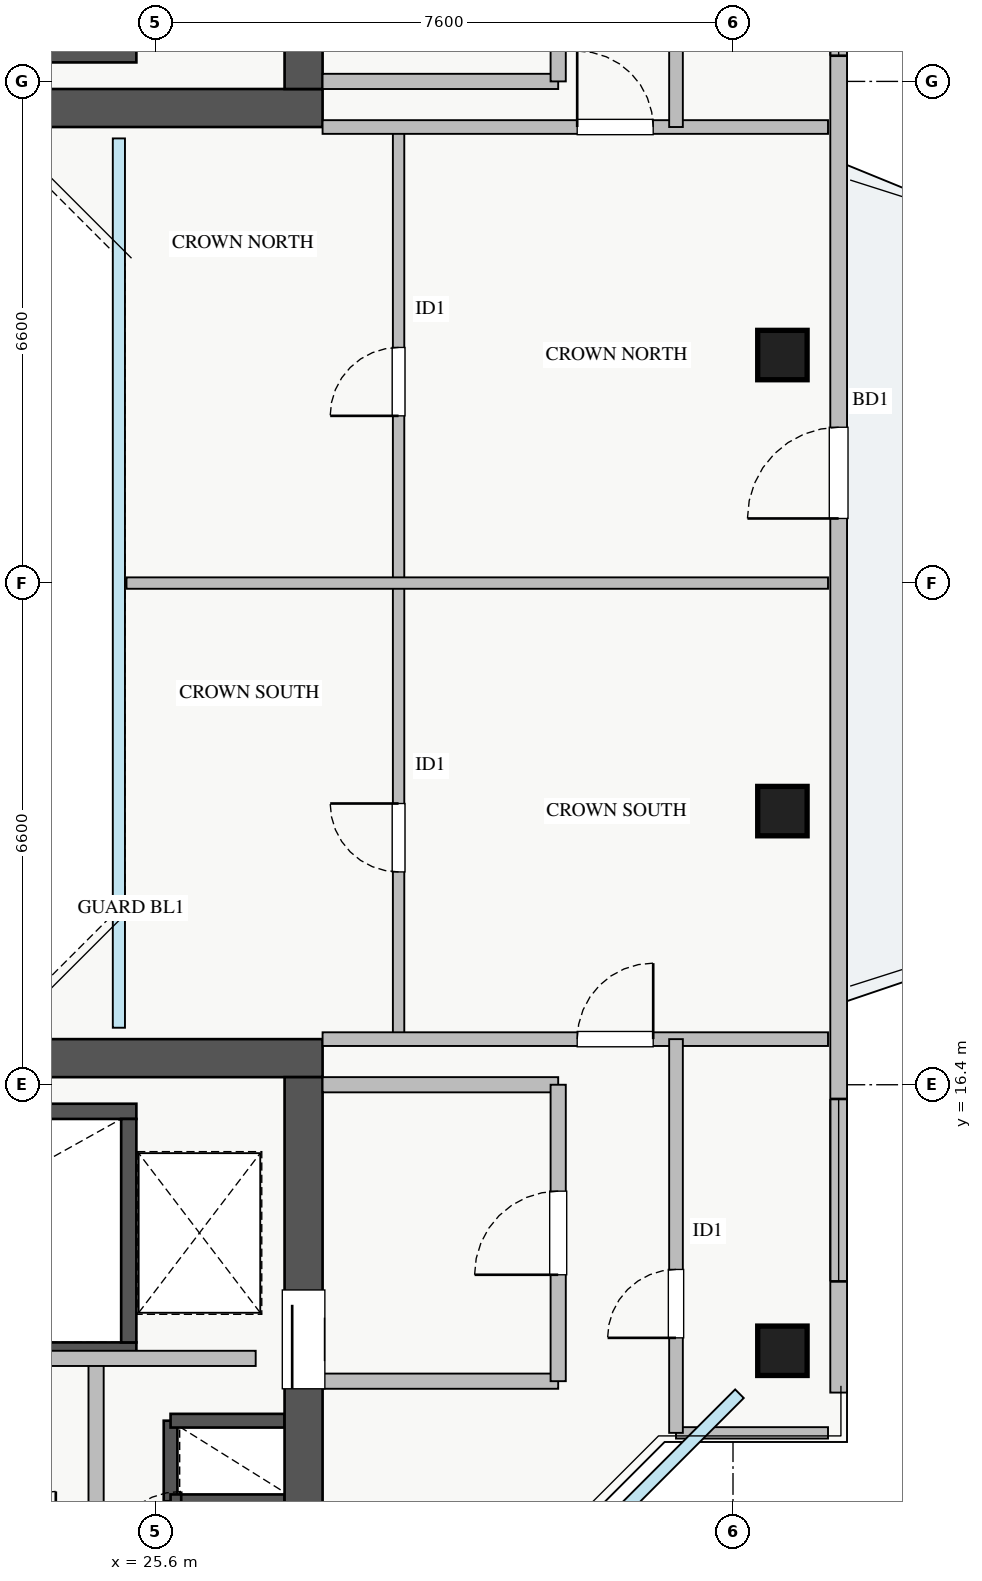
"""IFC4 building model, lengths in metres.
Left out: names, types, materials, properties, quantities, classifications, styles, units other than length and angle.
Written with IfcOpenShell. Run it as: python <this file> out.ifc"""

import sys

from ifc_helpers import new_model, si_unit, direction, frame, frame_2d, origin, origin_2d, place, context, subcontext, project, spatial, rectangle, extrude, source, transform, mapped, element, fill, save


model = new_model("IFC4")
c1 = context("Model", 3, precision=1e-05, world=origin(), true_north=direction((0.0, 1.0)))
c2 = subcontext(c1, "Body", "Model", "MODEL_VIEW")
j1 = project(units=[si_unit("LENGTHUNIT", "METRE"), si_unit("PLANEANGLEUNIT", "RADIAN")], contexts=[c1])
p1 = place(None, origin())
s1 = spatial("IfcSite", under=j1, at=p1, CompositionType="ELEMENT")
p2 = place(p1, origin())
s2 = spatial("IfcBuilding", under=s1, at=p2, CompositionType="ELEMENT")
p3 = place(p2, frame((0.0, 0.0, 240.5)))
s3 = spatial("IfcBuildingStorey", under=s2, at=p3, CompositionType="ELEMENT", Elevation=240.5)
p4 = place(p3, frame((25.8, 10.92, 0.0), z_axis=(0.0, 0.0, 1.0), x_axis=(0.0, 1.0, 0.0)))
e1 = element("IfcWall", 1, at=p4, inside=s3, PredefinedType="SHEAR", context=c2, shape_type="SweptSolid", body=[
    extrude(rectangle(XDim=1.06, YDim=0.18, at=frame_2d((0.53, 0.0))), origin(), (0.0, 0.0, 1.0), 3.07),
])
for number, where, z_axis, x_axis in (
    (2, (25.8, 11.98, 0.0), (0.0, 0.0, 1.0), (1.0, 0.0, 0.0)),
    (3, (25.8, 10.92, 0.0), (0.0, 0.0, 1.0), (1.0, 0.0, 0.0)),
):
    element("IfcWall", number, at=place(p3, frame(where, z_axis=z_axis, x_axis=x_axis)), inside=s3, PredefinedType="SHEAR", context=c2, shape_type="SweptSolid", body=[
        extrude(rectangle(XDim=1.5, YDim=0.18, at=frame_2d((0.75, 0.0))), origin(), (0.0, 0.0, 1.0), 3.07),
    ])
p5 = place(p3, frame((18.2, 29.95, 0.0), z_axis=(0.0, 0.0, 1.0), x_axis=(1.0, 0.0, 0.0)))
e4 = element("IfcWall", 4, at=p5, inside=s3, PredefinedType="SHEAR", context=c2, shape_type="SweptSolid", body=[
    extrude(rectangle(XDim=7.15, YDim=0.2, at=frame_2d((3.575, 0.0))), origin(), (0.0, 0.0, 1.0), 3.25),
])
p6 = place(p3, frame((18.2, 12.91, 0.0), z_axis=(0.0, 0.0, 1.0), x_axis=(1.0, 0.0, 0.0)))
e5 = element("IfcWall", 5, at=p6, inside=s3, PredefinedType="SHEAR", context=c2, shape_type="SweptSolid", body=[
    extrude(rectangle(XDim=7.15, YDim=0.2, at=frame_2d((3.575, 0.0))), origin(), (0.0, 0.0, 1.0), 3.25),
])
p7 = place(p6, frame((0.35, 0.0, 0.0)))
e6 = element("IfcOpeningElement", 6, at=p7, cuts=e5, PredefinedType="OPENING", context=c2, shape_type="SweptSolid", body=[
    extrude(rectangle(XDim=1.1, YDim=2.05, at=frame_2d((0.55, 1.025))), frame((0.0, 0.11, 0.0), z_axis=(0.0, -1.0, 0.0), x_axis=(1.0, 0.0, 0.0)), (0.0, 0.0, 1.0), 0.22),
])
p8 = place(p3, frame((18.2, 16.05, 0.0), z_axis=(0.0, 0.0, 1.0), x_axis=(1.0, 0.0, 0.0)))
e7 = element("IfcWall", 7, at=p8, inside=s3, PredefinedType="SHEAR", context=c2, shape_type="SweptSolid", body=[
    extrude(rectangle(XDim=7.15, YDim=0.2, at=frame_2d((3.575, 0.0))), origin(), (0.0, 0.0, 1.0), 3.25),
])
p9 = place(p3, frame((25.25, 13.01, 0.0), z_axis=(0.0, 0.0, 1.0), x_axis=(0.0, 1.0, 0.0)))
e8 = element("IfcWall", 8, at=p9, inside=s3, PredefinedType="SHEAR", context=c2, shape_type="SweptSolid", body=[
    extrude(rectangle(XDim=2.94, YDim=0.2, at=frame_2d((1.47, 0.0))), origin(), (0.0, 0.0, 1.0), 3.25),
])
p10 = place(p3, frame((10.2, 29.25, 0.0), z_axis=(0.0, 0.0, 1.0), x_axis=(1.0, 0.0, 0.0)))
e9 = element("IfcWall", 9, at=p10, inside=s3, PredefinedType="SHEAR", context=c2, shape_type="SweptSolid", body=[
    extrude(rectangle(XDim=17.6, YDim=0.5, at=frame_2d((8.8, 0.0))), origin(), (0.0, 0.0, 1.0), 3.25),
])
p11 = place(p3, frame((27.55, 29.5, 0.0), z_axis=(0.0, 0.0, 1.0), x_axis=(0.0, 1.0, 0.0)))
e10 = element("IfcWall", 10, at=p11, inside=s3, PredefinedType="SHEAR", context=c2, shape_type="SweptSolid", body=[
    extrude(rectangle(XDim=6.2, YDim=0.5, at=frame_2d((3.1, 0.0))), origin(), (0.0, 0.0, 1.0), 3.25),
])
p12 = place(p11, frame((1.1, 0.0, 0.0)))
e11 = element("IfcOpeningElement", 11, at=p12, cuts=e10, PredefinedType="OPENING", context=c2, shape_type="SweptSolid", body=[
    extrude(rectangle(XDim=1.3, YDim=2.05, at=frame_2d((0.65, 1.025))), frame((0.0, 0.26, 0.0), z_axis=(0.0, -1.0, 0.0), x_axis=(1.0, 0.0, 0.0)), (0.0, 0.0, 1.0), 0.52),
])
p13 = place(p3, frame((10.2, 16.75, 0.0), z_axis=(0.0, 0.0, 1.0), x_axis=(1.0, 0.0, 0.0)))
e12 = element("IfcWall", 12, at=p13, inside=s3, PredefinedType="SHEAR", context=c2, shape_type="SweptSolid", body=[
    extrude(rectangle(XDim=17.6, YDim=0.5, at=frame_2d((8.8, 0.0))), origin(), (0.0, 0.0, 1.0), 3.25),
])
p14 = place(p3, frame((27.55, 10.3, 0.0), z_axis=(0.0, 0.0, 1.0), x_axis=(0.0, 1.0, 0.0)))
e13 = element("IfcWall", 13, at=p14, inside=s3, PredefinedType="SHEAR", context=c2, shape_type="SweptSolid", body=[
    extrude(rectangle(XDim=6.2, YDim=0.5, at=frame_2d((3.1, 0.0))), origin(), (0.0, 0.0, 1.0), 3.25),
])
p15 = place(p14, frame((2.1, 0.0, 0.0)))
e14 = element("IfcOpeningElement", 14, at=p15, cuts=e13, PredefinedType="OPENING", context=c2, shape_type="SweptSolid", body=[
    extrude(rectangle(XDim=1.3, YDim=2.05, at=frame_2d((0.65, 1.025))), frame((0.0, 0.26, 0.0), z_axis=(0.0, -1.0, 0.0), x_axis=(1.0, 0.0, 0.0)), (0.0, 0.0, 1.0), 0.52),
])
m1 = source(origin(), c2, "Body", "SweptSolid", [
    extrude(rectangle(XDim=0.65, YDim=0.65, at=origin_2d()), origin(), (0.0, 0.0, 1.0), 3.25),
])
for number, where, z_axis, x_axis in (
    (15, (33.85, 12.9, 0.0), (0.0, 0.0, 1.0), (1.0, 0.0, 0.0)),
    (16, (33.85, 20.0, 0.0), (0.0, 0.0, 1.0), (1.0, 0.0, 0.0)),
    (17, (33.85, 26.0, 0.0), (0.0, 0.0, 1.0), (1.0, 0.0, 0.0)),
):
    element("IfcColumn", number, at=place(p3, frame(where, z_axis=z_axis, x_axis=x_axis)), inside=s3, PredefinedType="COLUMN", context=c2, shape_type="MappedRepresentation", body=[
        mapped(m1, transform((0.0, 0.0, 0.0), x_axis=(1.0, 0.0, 0.0), y_axis=(0.0, 1.0, 0.0), z_axis=(0.0, 0.0, 1.0), scale=1.0)),
    ])
p16 = place(p3, frame((34.59, 12.35, 0.0), z_axis=(0.0, 0.0, 1.0), x_axis=(0.0, 1.0, 0.0)))
e18 = element("IfcWall", 18, at=p16, inside=s3, PredefinedType="STANDARD", context=c2, shape_type="SweptSolid", body=[
    extrude(rectangle(XDim=21.3, YDim=0.22, at=frame_2d((10.65, 0.0))), origin(), (0.0, 0.0, 1.0), 2.61),
])
p17 = place(p16, frame((11.5, 0.0, 0.0)))
e19 = element("IfcOpeningElement", 19, at=p17, cuts=e18, PredefinedType="OPENING", context=c2, shape_type="SweptSolid", body=[
    extrude(rectangle(XDim=1.2, YDim=2.1, at=frame_2d((0.6, 1.05))), frame((0.0, 0.12, 0.0), z_axis=(0.0, -1.0, 0.0), x_axis=(1.0, 0.0, 0.0)), (0.0, 0.0, 1.0), 0.24),
])
p18 = place(p16, frame((1.463, 0.0, 0.9)))
e20 = element("IfcOpeningElement", 20, at=p18, cuts=e18, PredefinedType="OPENING", context=c2, shape_type="SweptSolid", body=[
    extrude(rectangle(XDim=2.4, YDim=1.48, at=frame_2d((1.2, 0.74))), frame((0.0, 0.12, 0.0), z_axis=(0.0, -1.0, 0.0), x_axis=(1.0, 0.0, 0.0)), (0.0, 0.0, 1.0), 0.24),
])
p19 = place(p16, frame((17.588, 0.0, 0.9)))
e21 = element("IfcOpeningElement", 21, at=p19, cuts=e18, PredefinedType="OPENING", context=c2, shape_type="SweptSolid", body=[
    extrude(rectangle(XDim=2.1, YDim=1.48, at=frame_2d((1.05, 0.74))), frame((0.0, 0.12, 0.0), z_axis=(0.0, -1.0, 0.0), x_axis=(1.0, 0.0, 0.0)), (0.0, 0.0, 1.0), 0.24),
])
p20 = place(p3, frame((27.8, 29.6, 0.0), z_axis=(0.0, 0.0, 1.0), x_axis=(1.0, 0.0, 0.0)))
e22 = element("IfcWall", 22, at=p20, inside=s3, PredefinedType="PARTITIONING", context=c2, shape_type="SweptSolid", body=[
    extrude(rectangle(XDim=3.1, YDim=0.2, at=frame_2d((1.55, 0.0))), origin(), (0.0, 0.0, 1.0), 3.07),
])
p21 = place(p3, frame((30.9, 29.6, 0.0), z_axis=(0.0, 0.0, 1.0), x_axis=(0.0, 1.0, 0.0)))
e23 = element("IfcWall", 23, at=p21, inside=s3, PredefinedType="PARTITIONING", context=c2, shape_type="SweptSolid", body=[
    extrude(rectangle(XDim=3.9, YDim=0.2, at=frame_2d((1.95, 0.0))), origin(), (0.0, 0.0, 1.0), 2.821),
])
p22 = place(p21, frame((1.4, 0.0, 0.0)))
e24 = element("IfcOpeningElement", 24, at=p22, cuts=e23, PredefinedType="OPENING", context=c2, shape_type="SweptSolid", body=[
    extrude(rectangle(XDim=1.1, YDim=2.05, at=frame_2d((0.55, 1.025))), frame((0.0, 0.11, 0.0), z_axis=(0.0, -1.0, 0.0), x_axis=(1.0, 0.0, 0.0)), (0.0, 0.0, 1.0), 0.22),
])
for number, where, z_axis, x_axis in (
    (25, (27.8, 16.4, 0.0), (0.0, 0.0, 1.0), (1.0, 0.0, 0.0)),
    (26, (27.8, 12.5, 0.0), (0.0, 0.0, 1.0), (1.0, 0.0, 0.0)),
):
    element("IfcWall", number, at=place(p3, frame(where, z_axis=z_axis, x_axis=x_axis)), inside=s3, PredefinedType="PARTITIONING", context=c2, shape_type="SweptSolid", body=[
        extrude(rectangle(XDim=3.1, YDim=0.2, at=frame_2d((1.55, 0.0))), origin(), (0.0, 0.0, 1.0), 3.07),
    ])
p23 = place(p3, frame((30.9, 12.5, 0.0), z_axis=(0.0, 0.0, 1.0), x_axis=(0.0, 1.0, 0.0)))
e27 = element("IfcWall", 27, at=p23, inside=s3, PredefinedType="PARTITIONING", context=c2, shape_type="SweptSolid", body=[
    extrude(rectangle(XDim=3.9, YDim=0.2, at=frame_2d((1.95, 0.0))), origin(), (0.0, 0.0, 1.0), 2.821),
])
p24 = place(p23, frame((1.4, 0.0, 0.0)))
e28 = element("IfcOpeningElement", 28, at=p24, cuts=e27, PredefinedType="OPENING", context=c2, shape_type="SweptSolid", body=[
    extrude(rectangle(XDim=1.1, YDim=2.05, at=frame_2d((0.55, 1.025))), frame((0.0, 0.11, 0.0), z_axis=(0.0, -1.0, 0.0), x_axis=(1.0, 0.0, 0.0)), (0.0, 0.0, 1.0), 0.22),
])
p25 = place(p3, frame((24.82, 10.15, 0.0), z_axis=(0.0, 0.0, 1.0), x_axis=(0.0, 1.0, 0.0)))
e29 = element("IfcWall", 29, at=p25, inside=s3, PredefinedType="PARTITIONING", context=c2, shape_type="SweptSolid", body=[
    extrude(rectangle(XDim=2.65, YDim=0.2, at=frame_2d((1.325, 0.0))), origin(), (0.0, 0.0, 1.0), 3.07),
])
p26 = place(p3, frame((21.75, 12.8, 0.0), z_axis=(0.0, 0.0, 1.0), x_axis=(1.0, 0.0, 0.0)))
e30 = element("IfcWall", 30, at=p26, inside=s3, PredefinedType="PARTITIONING", context=c2, shape_type="SweptSolid", body=[
    extrude(rectangle(XDim=5.17, YDim=0.2, at=frame_2d((2.585, 0.0))), origin(), (0.0, 0.0, 1.0), 3.07),
])
p27 = place(p3, frame((28.8, 17.0, 0.0), z_axis=(0.0, 0.0, 1.0), x_axis=(0.0, 1.0, 0.0)))
e31 = element("IfcWall", 31, at=p27, inside=s3, PredefinedType="PARTITIONING", context=c2, shape_type="SweptSolid", body=[
    extrude(rectangle(XDim=6.0, YDim=0.15, at=frame_2d((3.0, 0.0))), origin(), (0.0, 0.0, 1.0), 3.07),
])
p28 = place(p27, frame((2.2, 0.0, 0.0)))
e32 = element("IfcOpeningElement", 32, at=p28, cuts=e31, PredefinedType="OPENING", context=c2, shape_type="SweptSolid", body=[
    extrude(rectangle(XDim=0.9, YDim=2.05, at=frame_2d((0.45, 1.025))), frame((0.0, 0.085, 0.0), z_axis=(0.0, -1.0, 0.0), x_axis=(1.0, 0.0, 0.0)), (0.0, 0.0, 1.0), 0.17),
])
p29 = place(p3, frame((28.8, 23.0, 0.0), z_axis=(0.0, 0.0, 1.0), x_axis=(0.0, 1.0, 0.0)))
e33 = element("IfcWall", 33, at=p29, inside=s3, PredefinedType="PARTITIONING", context=c2, shape_type="SweptSolid", body=[
    extrude(rectangle(XDim=6.0, YDim=0.15, at=frame_2d((3.0, 0.0))), origin(), (0.0, 0.0, 1.0), 3.07),
])
p30 = place(p29, frame((2.2, 0.0, 0.0)))
e34 = element("IfcOpeningElement", 34, at=p30, cuts=e33, PredefinedType="OPENING", context=c2, shape_type="SweptSolid", body=[
    extrude(rectangle(XDim=0.9, YDim=2.05, at=frame_2d((0.45, 1.025))), frame((0.0, 0.085, 0.0), z_axis=(0.0, -1.0, 0.0), x_axis=(1.0, 0.0, 0.0)), (0.0, 0.0, 1.0), 0.17),
])
p31 = place(p3, frame((25.22, 23.0, 0.0), z_axis=(0.0, 0.0, 1.0), x_axis=(1.0, 0.0, 0.0)))
e35 = element("IfcWall", 35, at=p31, inside=s3, PredefinedType="PARTITIONING", context=c2, shape_type="SweptSolid", body=[
    extrude(rectangle(XDim=9.23, YDim=0.15, at=frame_2d((4.615, 0.0))), origin(), (0.0, 0.0, 1.0), 3.07),
])
p32 = place(p3, frame((27.8, 17.0, 0.0), z_axis=(0.0, 0.0, 1.0), x_axis=(1.0, 0.0, 0.0)))
e36 = element("IfcWall", 36, at=p32, inside=s3, PredefinedType="PARTITIONING", context=c2, shape_type="SweptSolid", body=[
    extrude(rectangle(XDim=6.65, YDim=0.18, at=frame_2d((3.325, 0.0))), origin(), (0.0, 0.0, 1.0), 3.07),
])
p33 = place(p32, frame((3.35, 0.0, 0.0)))
e37 = element("IfcOpeningElement", 37, at=p33, cuts=e36, PredefinedType="OPENING", context=c2, shape_type="SweptSolid", body=[
    extrude(rectangle(XDim=1.0, YDim=2.05, at=frame_2d((0.5, 1.025))), frame((0.0, 0.1, 0.0), z_axis=(0.0, -1.0, 0.0), x_axis=(1.0, 0.0, 0.0)), (0.0, 0.0, 1.0), 0.2),
])
p34 = place(p3, frame((27.8, 29.0, 0.0), z_axis=(0.0, 0.0, 1.0), x_axis=(1.0, 0.0, 0.0)))
e38 = element("IfcWall", 38, at=p34, inside=s3, PredefinedType="PARTITIONING", context=c2, shape_type="SweptSolid", body=[
    extrude(rectangle(XDim=6.65, YDim=0.18, at=frame_2d((3.325, 0.0))), origin(), (0.0, 0.0, 1.0), 3.07),
])
p35 = place(p34, frame((3.35, 0.0, 0.0)))
e39 = element("IfcOpeningElement", 39, at=p35, cuts=e38, PredefinedType="OPENING", context=c2, shape_type="SweptSolid", body=[
    extrude(rectangle(XDim=1.0, YDim=2.05, at=frame_2d((0.5, 1.025))), frame((0.0, 0.1, 0.0), z_axis=(0.0, -1.0, 0.0), x_axis=(1.0, 0.0, 0.0)), (0.0, 0.0, 1.0), 0.2),
])
p36 = place(p3, frame((32.45, 29.0, 0.0), z_axis=(0.0, 0.0, 1.0), x_axis=(0.0, 1.0, 0.0)))
e40 = element("IfcWall", 40, at=p36, inside=s3, PredefinedType="PARTITIONING", context=c2, shape_type="SweptSolid", body=[
    extrude(rectangle(XDim=5.18, YDim=0.18, at=frame_2d((2.59, 0.0))), origin(), (0.0, 0.0, 1.0), 3.07),
])
p37 = place(p36, frame((1.25, 0.0, 0.0)))
e41 = element("IfcOpeningElement", 41, at=p37, cuts=e40, PredefinedType="OPENING", context=c2, shape_type="SweptSolid", body=[
    extrude(rectangle(XDim=0.9, YDim=2.05, at=frame_2d((0.45, 1.025))), frame((0.0, 0.1, 0.0), z_axis=(0.0, -1.0, 0.0), x_axis=(1.0, 0.0, 0.0)), (0.0, 0.0, 1.0), 0.2),
])
p38 = place(p3, frame((32.45, 11.82, 0.0), z_axis=(0.0, 0.0, 1.0), x_axis=(1.0, 0.0, 0.0)))
e42 = element("IfcWall", 42, at=p38, inside=s3, PredefinedType="PARTITIONING", context=c2, shape_type="SweptSolid", body=[
    extrude(rectangle(XDim=2.0, YDim=0.15, at=frame_2d((1.0, 0.0))), origin(), (0.0, 0.0, 1.0), 3.07),
])
p39 = place(p3, frame((32.45, 11.82, 0.0), z_axis=(0.0, 0.0, 1.0), x_axis=(0.0, 1.0, 0.0)))
e43 = element("IfcWall", 43, at=p39, inside=s3, PredefinedType="PARTITIONING", context=c2, shape_type="SweptSolid", body=[
    extrude(rectangle(XDim=5.18, YDim=0.18, at=frame_2d((2.59, 0.0))), origin(), (0.0, 0.0, 1.0), 3.07),
])
p40 = place(p39, frame((1.25, 0.0, 0.0)))
e44 = element("IfcOpeningElement", 44, at=p40, cuts=e43, PredefinedType="OPENING", context=c2, shape_type="SweptSolid", body=[
    extrude(rectangle(XDim=0.9, YDim=2.05, at=frame_2d((0.45, 1.025))), frame((0.0, 0.1, 0.0), z_axis=(0.0, -1.0, 0.0), x_axis=(1.0, 0.0, 0.0)), (0.0, 0.0, 1.0), 0.2),
])
m2 = source(origin(), c2, "Body", "SweptSolid", [
    extrude(rectangle(XDim=1.2, YDim=2.1, at=frame_2d((0.6, 1.05))), frame((0.0, 0.025, 0.0), z_axis=(0.0, -1.0, 0.0), x_axis=(1.0, 0.0, 0.0)), (0.0, 0.0, 1.0), 0.05),
])
p41 = place(p17, origin())
e45 = element("IfcDoor", 45, at=p41, inside=s3, OperationType="SINGLE_SWING_LEFT", PredefinedType="DOOR", context=c2, shape_type="MappedRepresentation", body=[
    mapped(m2, transform((0.0, 0.0, 0.0), x_axis=(1.0, 0.0, 0.0), y_axis=(0.0, 1.0, 0.0), z_axis=(0.0, 0.0, 1.0), scale=1.0)),
])
fill(e19, e45)
m3 = source(origin(), c2, "Body", "SweptSolid", [
    extrude(rectangle(XDim=2.4, YDim=1.48, at=frame_2d((1.2, 0.74))), frame((0.0, 0.03, 0.0), z_axis=(0.0, -1.0, 0.0), x_axis=(1.0, 0.0, 0.0)), (0.0, 0.0, 1.0), 0.06),
])
p42 = place(p18, origin())
e46 = element("IfcWindow", 46, at=p42, inside=s3, PartitioningType="TRIPLE_PANEL_VERTICAL", PredefinedType="WINDOW", context=c2, shape_type="MappedRepresentation", body=[
    mapped(m3, transform((0.0, 0.0, 0.0), x_axis=(1.0, 0.0, 0.0), y_axis=(0.0, 1.0, 0.0), z_axis=(0.0, 0.0, 1.0), scale=1.0)),
])
fill(e20, e46)
m4 = source(origin(), c2, "Body", "SweptSolid", [
    extrude(rectangle(XDim=2.1, YDim=1.48, at=frame_2d((1.05, 0.74))), frame((0.0, 0.03, 0.0), z_axis=(0.0, -1.0, 0.0), x_axis=(1.0, 0.0, 0.0)), (0.0, 0.0, 1.0), 0.06),
])
p43 = place(p19, origin())
e47 = element("IfcWindow", 47, at=p43, inside=s3, PartitioningType="TRIPLE_PANEL_VERTICAL", PredefinedType="WINDOW", context=c2, shape_type="MappedRepresentation", body=[
    mapped(m4, transform((0.0, 0.0, 0.0), x_axis=(1.0, 0.0, 0.0), y_axis=(0.0, 1.0, 0.0), z_axis=(0.0, 0.0, 1.0), scale=1.0)),
])
fill(e21, e47)
m5 = source(origin(), c2, "Body", "SweptSolid", [
    extrude(rectangle(XDim=1.3, YDim=2.05, at=frame_2d((0.65, 1.025))), frame((0.0, 0.025, 0.0), z_axis=(0.0, -1.0, 0.0), x_axis=(1.0, 0.0, 0.0)), (0.0, 0.0, 1.0), 0.05),
])
p44 = place(p15, origin())
e48 = element("IfcDoor", 48, at=p44, inside=s3, OperationType="SLIDING_TO_RIGHT", PredefinedType="DOOR", context=c2, shape_type="MappedRepresentation", body=[
    mapped(m5, transform((0.0, 0.0, 0.0), x_axis=(1.0, 0.0, 0.0), y_axis=(0.0, 1.0, 0.0), z_axis=(0.0, 0.0, 1.0), scale=1.0)),
])
fill(e14, e48)
m6 = source(origin(), c2, "Body", "SweptSolid", [
    extrude(rectangle(XDim=1.1, YDim=2.05, at=frame_2d((0.55, 1.025))), frame((0.0, 0.025, 0.0), z_axis=(0.0, -1.0, 0.0), x_axis=(1.0, 0.0, 0.0)), (0.0, 0.0, 1.0), 0.05),
])
p45 = place(p24, origin())
e49 = element("IfcDoor", 49, at=p45, inside=s3, OperationType="SINGLE_SWING_LEFT", PredefinedType="DOOR", context=c2, shape_type="MappedRepresentation", body=[
    mapped(m6, transform((0.0, 0.0, 0.0), x_axis=(1.0, 0.0, 0.0), y_axis=(0.0, 1.0, 0.0), z_axis=(0.0, 0.0, 1.0), scale=1.0)),
])
fill(e28, e49)
m7 = source(origin(), c2, "Body", "SweptSolid", [
    extrude(rectangle(XDim=0.9, YDim=2.05, at=frame_2d((0.45, 1.025))), frame((0.0, 0.025, 0.0), z_axis=(0.0, -1.0, 0.0), x_axis=(1.0, 0.0, 0.0)), (0.0, 0.0, 1.0), 0.05),
])
p46 = place(p28, origin())
e50 = element("IfcDoor", 50, at=p46, inside=s3, OperationType="SINGLE_SWING_RIGHT", PredefinedType="DOOR", context=c2, shape_type="MappedRepresentation", body=[
    mapped(m7, transform((0.0, 0.0, 0.0), x_axis=(1.0, 0.0, 0.0), y_axis=(0.0, 1.0, 0.0), z_axis=(0.0, 0.0, 1.0), scale=1.0)),
])
fill(e32, e50)
p47 = place(p30, origin())
e51 = element("IfcDoor", 51, at=p47, inside=s3, OperationType="SINGLE_SWING_LEFT", PredefinedType="DOOR", context=c2, shape_type="MappedRepresentation", body=[
    mapped(m7, transform((0.0, 0.0, 0.0), x_axis=(1.0, 0.0, 0.0), y_axis=(0.0, 1.0, 0.0), z_axis=(0.0, 0.0, 1.0), scale=1.0)),
])
fill(e34, e51)
m8 = source(origin(), c2, "Body", "SweptSolid", [
    extrude(rectangle(XDim=1.0, YDim=2.05, at=frame_2d((0.5, 1.025))), frame((0.0, 0.025, 0.0), z_axis=(0.0, -1.0, 0.0), x_axis=(1.0, 0.0, 0.0)), (0.0, 0.0, 1.0), 0.05),
])
p48 = place(p33, origin())
e52 = element("IfcDoor", 52, at=p48, inside=s3, OperationType="SINGLE_SWING_RIGHT", PredefinedType="DOOR", context=c2, shape_type="MappedRepresentation", body=[
    mapped(m8, transform((0.0, 0.0, 0.0), x_axis=(1.0, 0.0, 0.0), y_axis=(0.0, 1.0, 0.0), z_axis=(0.0, 0.0, 1.0), scale=1.0)),
])
fill(e37, e52)
p49 = place(p35, origin())
e53 = element("IfcDoor", 53, at=p49, inside=s3, OperationType="SINGLE_SWING_LEFT", PredefinedType="DOOR", context=c2, shape_type="MappedRepresentation", body=[
    mapped(m8, transform((0.0, 0.0, 0.0), x_axis=(1.0, 0.0, 0.0), y_axis=(0.0, 1.0, 0.0), z_axis=(0.0, 0.0, 1.0), scale=1.0)),
])
fill(e39, e53)
p50 = place(p40, origin())
e54 = element("IfcDoor", 54, at=p50, inside=s3, OperationType="SINGLE_SWING_LEFT", PredefinedType="DOOR", context=c2, shape_type="MappedRepresentation", body=[
    mapped(m7, transform((0.0, 0.0, 0.0), x_axis=(1.0, 0.0, 0.0), y_axis=(0.0, 1.0, 0.0), z_axis=(0.0, 0.0, 1.0), scale=1.0)),
])
fill(e44, e54)
save(model, sys.argv[1])
